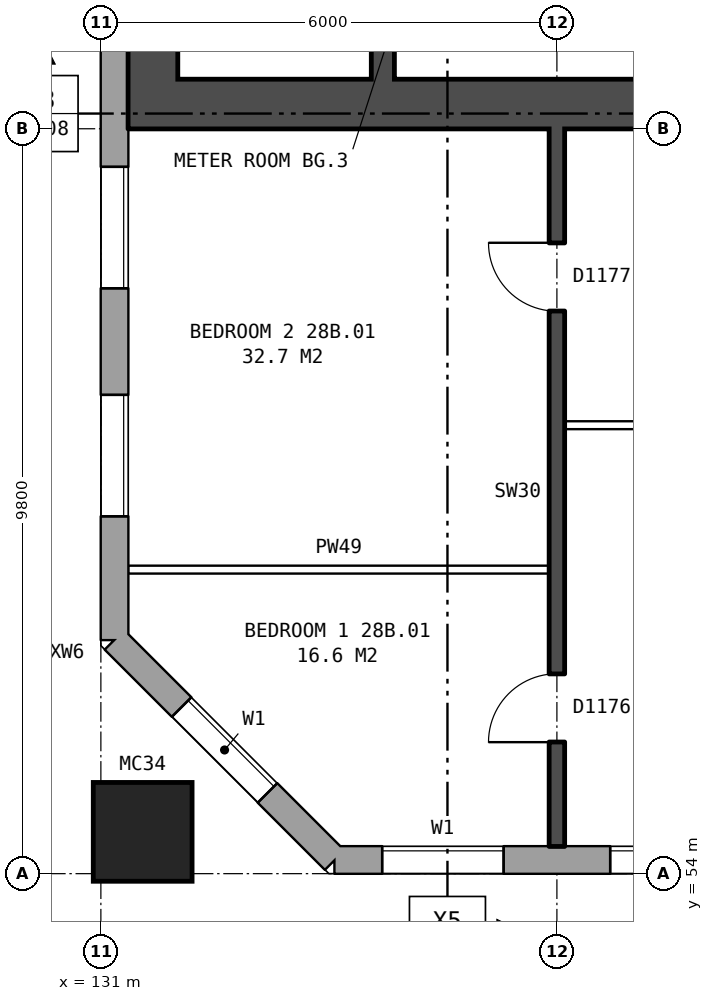
"""IFC4 building model, lengths in metres.
Left out: names, types, materials, properties, quantities, classifications, styles, units other than length and angle.
Written with IfcOpenShell. Run it as: python <this file> out.ifc"""

import sys

from ifc_helpers import new_model, si_unit, direction, frame, frame_2d, origin, origin_2d, place, context, subcontext, project, spatial, rectangle, hollow_rectangle, extrude, element, fill, save


model = new_model("IFC4")
c1 = context("Model", 3, precision=1e-05, world=origin(), true_north=direction((0.0, 1.0)))
c2 = subcontext(c1, "Body", "Model", "MODEL_VIEW")
j1 = project(units=[si_unit("LENGTHUNIT", "METRE"), si_unit("PLANEANGLEUNIT", "RADIAN")], contexts=[c1])
p1 = place(None, origin())
s1 = spatial("IfcSite", under=j1, at=p1, CompositionType="ELEMENT")
p2 = place(p1, origin())
s2 = spatial("IfcBuilding", under=s1, at=p2, CompositionType="ELEMENT")
p3 = place(p2, frame((0.0, 0.0, 102.6)))
s3 = spatial("IfcBuildingStorey", under=s2, at=p3, CompositionType="ELEMENT", Elevation=102.6)
p4 = place(p3, frame((131.55, 54.55, 0.0), z_axis=(0.0, 0.0, 1.0), x_axis=(1.0, 0.0, 0.0)))
e1 = element("IfcColumn", 1, at=p4, inside=s3, PredefinedType="COLUMN", context=c2, shape_type="SweptSolid", body=[
    extrude(hollow_rectangle(XDim=1.3, YDim=1.3, WallThickness=0.07, at=origin_2d()), origin(), (0.0, 0.0, 1.0), 3.1),
])
p5 = place(p3, frame((131.18, 57.075, 0.0), z_axis=(0.0, 0.0, 1.0), x_axis=(0.707106781187, -0.707106781187, 0.0)))
e2 = element("IfcWall", 2, at=p5, inside=s3, PredefinedType="STANDARD", context=c2, shape_type="SweptSolid", body=[
    extrude(rectangle(XDim=4.094, YDim=0.36, at=frame_2d((2.047, 0.0))), origin(), (0.0, 0.0, 1.0), 2.85),
])
p6 = place(p5, frame((1.247, 0.0, 0.8)))
e3 = element("IfcOpeningElement", 3, at=p6, cuts=e2, PredefinedType="OPENING", context=c2, shape_type="SweptSolid", body=[
    extrude(rectangle(XDim=1.6, YDim=1.8, at=frame_2d((0.8, 0.9))), frame((0.0, 0.19, 0.0), z_axis=(0.0, -1.0, 0.0), x_axis=(1.0, 0.0, 0.0)), (0.0, 0.0, 1.0), 0.38),
])
p7 = place(p3, frame((134.075, 54.18, 0.0), z_axis=(0.0, 0.0, 1.0), x_axis=(1.0, 0.0, 0.0)))
e4 = element("IfcWall", 4, at=p7, inside=s3, PredefinedType="STANDARD", context=c2, shape_type="SweptSolid", body=[
    extrude(rectangle(XDim=36.851, YDim=0.36, at=frame_2d((18.425, 0.0))), origin(), (0.0, 0.0, 1.0), 2.85),
])
p8 = place(p7, frame((0.625, 0.0, 0.8)))
e5 = element("IfcOpeningElement", 5, at=p8, cuts=e4, PredefinedType="OPENING", context=c2, shape_type="SweptSolid", body=[
    extrude(rectangle(XDim=1.6, YDim=1.8, at=frame_2d((0.8, 0.9))), frame((0.0, 0.19, 0.0), z_axis=(0.0, -1.0, 0.0), x_axis=(1.0, 0.0, 0.0)), (0.0, 0.0, 1.0), 0.38),
])
p9 = place(p7, frame((3.625, 0.0, 0.8)))
e6 = element("IfcOpeningElement", 6, at=p9, cuts=e4, PredefinedType="OPENING", context=c2, shape_type="SweptSolid", body=[
    extrude(rectangle(XDim=1.6, YDim=1.8, at=frame_2d((0.8, 0.9))), frame((0.0, 0.19, 0.0), z_axis=(0.0, -1.0, 0.0), x_axis=(1.0, 0.0, 0.0)), (0.0, 0.0, 1.0), 0.38),
])
p10 = place(p7, frame((7.475, 0.0, 0.8)))
e7 = element("IfcOpeningElement", 7, at=p10, cuts=e4, PredefinedType="OPENING", context=c2, shape_type="SweptSolid", body=[
    extrude(rectangle(XDim=1.2, YDim=1.2, at=frame_2d((0.6, 0.6))), frame((0.0, 0.19, 0.0), z_axis=(0.0, -1.0, 0.0), x_axis=(1.0, 0.0, 0.0)), (0.0, 0.0, 1.0), 0.38),
])
p11 = place(p7, frame((9.625, 0.0, 0.8)))
e8 = element("IfcOpeningElement", 8, at=p11, cuts=e4, PredefinedType="OPENING", context=c2, shape_type="SweptSolid", body=[
    extrude(rectangle(XDim=1.6, YDim=1.8, at=frame_2d((0.8, 0.9))), frame((0.0, 0.19, 0.0), z_axis=(0.0, -1.0, 0.0), x_axis=(1.0, 0.0, 0.0)), (0.0, 0.0, 1.0), 0.38),
])
p12 = place(p7, frame((12.625, 0.0, 0.8)))
e9 = element("IfcOpeningElement", 9, at=p12, cuts=e4, PredefinedType="OPENING", context=c2, shape_type="SweptSolid", body=[
    extrude(rectangle(XDim=1.6, YDim=1.8, at=frame_2d((0.8, 0.9))), frame((0.0, 0.19, 0.0), z_axis=(0.0, -1.0, 0.0), x_axis=(1.0, 0.0, 0.0)), (0.0, 0.0, 1.0), 0.38),
])
p13 = place(p7, frame((15.625, 0.0, 0.8)))
e10 = element("IfcOpeningElement", 10, at=p13, cuts=e4, PredefinedType="OPENING", context=c2, shape_type="SweptSolid", body=[
    extrude(rectangle(XDim=1.6, YDim=1.8, at=frame_2d((0.8, 0.9))), frame((0.0, 0.19, 0.0), z_axis=(0.0, -1.0, 0.0), x_axis=(1.0, 0.0, 0.0)), (0.0, 0.0, 1.0), 0.38),
])
p14 = place(p7, frame((18.625, 0.0, 0.8)))
e11 = element("IfcOpeningElement", 11, at=p14, cuts=e4, PredefinedType="OPENING", context=c2, shape_type="SweptSolid", body=[
    extrude(rectangle(XDim=1.6, YDim=1.8, at=frame_2d((0.8, 0.9))), frame((0.0, 0.19, 0.0), z_axis=(0.0, -1.0, 0.0), x_axis=(1.0, 0.0, 0.0)), (0.0, 0.0, 1.0), 0.38),
])
p15 = place(p7, frame((21.625, 0.0, 0.8)))
e12 = element("IfcOpeningElement", 12, at=p15, cuts=e4, PredefinedType="OPENING", context=c2, shape_type="SweptSolid", body=[
    extrude(rectangle(XDim=1.6, YDim=1.8, at=frame_2d((0.8, 0.9))), frame((0.0, 0.19, 0.0), z_axis=(0.0, -1.0, 0.0), x_axis=(1.0, 0.0, 0.0)), (0.0, 0.0, 1.0), 0.38),
])
p16 = place(p7, frame((24.625, 0.0, 0.8)))
e13 = element("IfcOpeningElement", 13, at=p16, cuts=e4, PredefinedType="OPENING", context=c2, shape_type="SweptSolid", body=[
    extrude(rectangle(XDim=1.6, YDim=1.8, at=frame_2d((0.8, 0.9))), frame((0.0, 0.19, 0.0), z_axis=(0.0, -1.0, 0.0), x_axis=(1.0, 0.0, 0.0)), (0.0, 0.0, 1.0), 0.38),
])
p17 = place(p7, frame((27.125, 0.0, 0.8)))
e14 = element("IfcOpeningElement", 14, at=p17, cuts=e4, PredefinedType="OPENING", context=c2, shape_type="SweptSolid", body=[
    extrude(rectangle(XDim=1.4, YDim=1.8, at=frame_2d((0.7, 0.9))), frame((0.0, 0.19, 0.0), z_axis=(0.0, -1.0, 0.0), x_axis=(1.0, 0.0, 0.0)), (0.0, 0.0, 1.0), 0.38),
])
p18 = place(p7, frame((28.825, 0.0, 0.8)))
e15 = element("IfcOpeningElement", 15, at=p18, cuts=e4, PredefinedType="OPENING", context=c2, shape_type="SweptSolid", body=[
    extrude(rectangle(XDim=0.8, YDim=0.9, at=frame_2d((0.4, 0.45))), frame((0.0, 0.19, 0.0), z_axis=(0.0, -1.0, 0.0), x_axis=(1.0, 0.0, 0.0)), (0.0, 0.0, 1.0), 0.38),
])
p19 = place(p7, frame((33.625, 0.0, 0.8)))
e16 = element("IfcOpeningElement", 16, at=p19, cuts=e4, PredefinedType="OPENING", context=c2, shape_type="SweptSolid", body=[
    extrude(rectangle(XDim=1.6, YDim=1.8, at=frame_2d((0.8, 0.9))), frame((0.0, 0.19, 0.0), z_axis=(0.0, -1.0, 0.0), x_axis=(1.0, 0.0, 0.0)), (0.0, 0.0, 1.0), 0.38),
])
p20 = place(p7, frame((30.825, 0.0, 1.7)))
e17 = element("IfcOpeningElement", 17, at=p20, cuts=e4, PredefinedType="OPENING", context=c2, shape_type="SweptSolid", body=[
    extrude(rectangle(XDim=0.8, YDim=0.9, at=frame_2d((0.4, 0.45))), frame((0.0, 0.19, 0.0), z_axis=(0.0, -1.0, 0.0), x_axis=(1.0, 0.0, 0.0)), (0.0, 0.0, 1.0), 0.38),
])
p21 = place(p7, frame((31.925, 0.0, 0.8)))
e18 = element("IfcOpeningElement", 18, at=p21, cuts=e4, PredefinedType="OPENING", context=c2, shape_type="SweptSolid", body=[
    extrude(rectangle(XDim=0.8, YDim=1.8, at=frame_2d((0.4, 0.9))), frame((0.0, 0.19, 0.0), z_axis=(0.0, -1.0, 0.0), x_axis=(1.0, 0.0, 0.0)), (0.0, 0.0, 1.0), 0.38),
])
p22 = place(p3, frame((131.18, 82.925, 0.0), z_axis=(0.0, 0.0, 1.0), x_axis=(0.0, -1.0, 0.0)))
e19 = element("IfcWall", 19, at=p22, inside=s3, PredefinedType="STANDARD", context=c2, shape_type="SweptSolid", body=[
    extrude(rectangle(XDim=25.851, YDim=0.36, at=frame_2d((12.925, 0.0))), origin(), (0.0, 0.0, 1.0), 2.85),
])
p23 = place(p22, frame((1.625, 0.0, 0.8)))
e20 = element("IfcOpeningElement", 20, at=p23, cuts=e19, PredefinedType="OPENING", context=c2, shape_type="SweptSolid", body=[
    extrude(rectangle(XDim=1.6, YDim=1.8, at=frame_2d((0.8, 0.9))), frame((0.0, 0.19, 0.0), z_axis=(0.0, -1.0, 0.0), x_axis=(1.0, 0.0, 0.0)), (0.0, 0.0, 1.0), 0.38),
])
p24 = place(p22, frame((4.625, 0.0, 0.8)))
e21 = element("IfcOpeningElement", 21, at=p24, cuts=e19, PredefinedType="OPENING", context=c2, shape_type="SweptSolid", body=[
    extrude(rectangle(XDim=1.6, YDim=1.8, at=frame_2d((0.8, 0.9))), frame((0.0, 0.19, 0.0), z_axis=(0.0, -1.0, 0.0), x_axis=(1.0, 0.0, 0.0)), (0.0, 0.0, 1.0), 0.38),
])
p25 = place(p22, frame((19.625, 0.0, 0.8)))
e22 = element("IfcOpeningElement", 22, at=p25, cuts=e19, PredefinedType="OPENING", context=c2, shape_type="SweptSolid", body=[
    extrude(rectangle(XDim=1.6, YDim=1.8, at=frame_2d((0.8, 0.9))), frame((0.0, 0.19, 0.0), z_axis=(0.0, -1.0, 0.0), x_axis=(1.0, 0.0, 0.0)), (0.0, 0.0, 1.0), 0.38),
])
p26 = place(p22, frame((22.625, 0.0, 0.8)))
e23 = element("IfcOpeningElement", 23, at=p26, cuts=e19, PredefinedType="OPENING", context=c2, shape_type="SweptSolid", body=[
    extrude(rectangle(XDim=1.6, YDim=1.8, at=frame_2d((0.8, 0.9))), frame((0.0, 0.19, 0.0), z_axis=(0.0, -1.0, 0.0), x_axis=(1.0, 0.0, 0.0)), (0.0, 0.0, 1.0), 0.38),
])
p27 = place(p3, frame((131.685, 64.45, 0.0), z_axis=(0.0, 0.0, 1.0), x_axis=(0.0, 1.0, 0.0)))
e24 = element("IfcWall", 24, at=p27, inside=s3, PredefinedType="SHEAR", context=c2, shape_type="SweptSolid", body=[
    extrude(rectangle(XDim=11.1, YDim=0.65, at=frame_2d((5.55, 0.0))), origin(), (0.0, 0.0, 1.0), 2.85),
])
p28 = place(p3, frame((139.76, 64.125, 0.0), z_axis=(0.0, 0.0, 1.0), x_axis=(-1.0, 0.0, 0.0)))
e25 = element("IfcWall", 25, at=p28, inside=s3, PredefinedType="SHEAR", context=c2, shape_type="SweptSolid", body=[
    extrude(rectangle(XDim=8.4, YDim=0.65, at=frame_2d((4.2, 0.0))), origin(), (0.0, 0.0, 1.0), 2.85),
])
p29 = place(p3, frame((134.71, 64.45, 0.0), z_axis=(0.0, 0.0, 1.0), x_axis=(0.0, 1.0, 0.0)))
e26 = element("IfcWall", 26, at=p29, inside=s3, PredefinedType="SHEAR", context=c2, shape_type="SweptSolid", body=[
    extrude(rectangle(XDim=6.65, YDim=0.3, at=frame_2d((3.325, 0.0))), origin(), (0.0, 0.0, 1.0), 2.85),
])
p30 = place(p3, frame((131.36, 58.0, 0.0), z_axis=(0.0, 0.0, 1.0), x_axis=(1.0, 0.0, 0.0)))
e27 = element("IfcWall", 27, at=p30, inside=s3, PredefinedType="PARTITIONING", context=c2, shape_type="SweptSolid", body=[
    extrude(rectangle(XDim=5.54, YDim=0.1, at=frame_2d((2.77, 0.0))), origin(), (0.0, 0.0, 1.0), 2.85),
])
p31 = place(p3, frame((137.1, 59.9, 0.0), z_axis=(0.0, 0.0, 1.0), x_axis=(1.0, 0.0, 0.0)))
e28 = element("IfcWall", 28, at=p31, inside=s3, PredefinedType="PARTITIONING", context=c2, shape_type="SweptSolid", body=[
    extrude(rectangle(XDim=5.8, YDim=0.1, at=frame_2d((2.9, 0.0))), origin(), (0.0, 0.0, 1.0), 2.85),
])
p32 = place(p31, frame((1.3, 0.0, 0.0)))
e29 = element("IfcOpeningElement", 29, at=p32, cuts=e28, PredefinedType="OPENING", context=c2, shape_type="SweptSolid", body=[
    extrude(rectangle(XDim=0.9, YDim=2.1, at=frame_2d((0.45, 1.05))), frame((0.0, 0.06, 0.0), z_axis=(0.0, -1.0, 0.0), x_axis=(1.0, 0.0, 0.0)), (0.0, 0.0, 1.0), 0.12),
])
p33 = place(p31, frame((4.2, 0.0, 0.0)))
e30 = element("IfcOpeningElement", 30, at=p33, cuts=e28, PredefinedType="OPENING", context=c2, shape_type="SweptSolid", body=[
    extrude(rectangle(XDim=0.9, YDim=2.1, at=frame_2d((0.45, 1.05))), frame((0.0, 0.06, 0.0), z_axis=(0.0, -1.0, 0.0), x_axis=(1.0, 0.0, 0.0)), (0.0, 0.0, 1.0), 0.12),
])
p34 = place(p3, frame((137.0, 54.36, 0.0), z_axis=(0.0, 0.0, 1.0), x_axis=(0.0, 1.0, 0.0)))
e31 = element("IfcWall", 31, at=p34, inside=s3, PredefinedType="SOLIDWALL", context=c2, shape_type="SweptSolid", body=[
    extrude(rectangle(XDim=9.44, YDim=0.2, at=frame_2d((4.72, 0.0))), origin(), (0.0, 0.0, 1.0), 2.85),
])
p35 = place(p34, frame((1.37, 0.0, 0.0)))
e32 = element("IfcOpeningElement", 32, at=p35, cuts=e31, PredefinedType="OPENING", context=c2, shape_type="SweptSolid", body=[
    extrude(rectangle(XDim=0.9, YDim=2.1, at=frame_2d((0.45, 1.05))), frame((0.0, 0.11, 0.0), z_axis=(0.0, -1.0, 0.0), x_axis=(1.0, 0.0, 0.0)), (0.0, 0.0, 1.0), 0.22),
])
p36 = place(p34, frame((7.04, 0.0, 0.0)))
e33 = element("IfcOpeningElement", 33, at=p36, cuts=e31, PredefinedType="OPENING", context=c2, shape_type="SweptSolid", body=[
    extrude(rectangle(XDim=0.9, YDim=2.1, at=frame_2d((0.45, 1.05))), frame((0.0, 0.11, 0.0), z_axis=(0.0, -1.0, 0.0), x_axis=(1.0, 0.0, 0.0)), (0.0, 0.0, 1.0), 0.22),
])
p37 = place(p6, origin())
e34 = element("IfcWindow", 34, at=p37, inside=s3, PartitioningType="SINGLE_PANEL", PredefinedType="WINDOW", context=c2, shape_type="SweptSolid", body=[
    extrude(rectangle(XDim=1.6, YDim=1.8, at=frame_2d((0.8, 0.9))), frame((0.0, 0.15, 0.0), z_axis=(0.0, -1.0, 0.0), x_axis=(1.0, 0.0, 0.0)), (0.0, 0.0, 1.0), 0.06),
])
fill(e3, e34)
p38 = place(p8, origin())
e35 = element("IfcWindow", 35, at=p38, inside=s3, PartitioningType="SINGLE_PANEL", PredefinedType="WINDOW", context=c2, shape_type="SweptSolid", body=[
    extrude(rectangle(XDim=1.6, YDim=1.8, at=frame_2d((0.8, 0.9))), frame((0.0, 0.15, 0.0), z_axis=(0.0, -1.0, 0.0), x_axis=(1.0, 0.0, 0.0)), (0.0, 0.0, 1.0), 0.06),
])
fill(e5, e35)
p39 = place(p9, origin())
e36 = element("IfcWindow", 36, at=p39, inside=s3, PartitioningType="SINGLE_PANEL", PredefinedType="WINDOW", context=c2, shape_type="SweptSolid", body=[
    extrude(rectangle(XDim=1.6, YDim=1.8, at=frame_2d((0.8, 0.9))), frame((0.0, 0.15, 0.0), z_axis=(0.0, -1.0, 0.0), x_axis=(1.0, 0.0, 0.0)), (0.0, 0.0, 1.0), 0.06),
])
fill(e6, e36)
p40 = place(p25, origin())
e37 = element("IfcWindow", 37, at=p40, inside=s3, PartitioningType="SINGLE_PANEL", PredefinedType="WINDOW", context=c2, shape_type="SweptSolid", body=[
    extrude(rectangle(XDim=1.6, YDim=1.8, at=frame_2d((0.8, 0.9))), frame((0.0, 0.15, 0.0), z_axis=(0.0, -1.0, 0.0), x_axis=(1.0, 0.0, 0.0)), (0.0, 0.0, 1.0), 0.06),
])
fill(e22, e37)
p41 = place(p26, origin())
e38 = element("IfcWindow", 38, at=p41, inside=s3, PartitioningType="SINGLE_PANEL", PredefinedType="WINDOW", context=c2, shape_type="SweptSolid", body=[
    extrude(rectangle(XDim=1.6, YDim=1.8, at=frame_2d((0.8, 0.9))), frame((0.0, 0.15, 0.0), z_axis=(0.0, -1.0, 0.0), x_axis=(1.0, 0.0, 0.0)), (0.0, 0.0, 1.0), 0.06),
])
fill(e23, e38)
p42 = place(p35, origin())
e39 = element("IfcDoor", 39, at=p42, inside=s3, OperationType="SINGLE_SWING_LEFT", PredefinedType="DOOR", context=c2, shape_type="SweptSolid", body=[
    extrude(rectangle(XDim=0.9, YDim=2.1, at=frame_2d((0.45, 1.05))), frame((0.0, 0.025, 0.0), z_axis=(0.0, -1.0, 0.0), x_axis=(1.0, 0.0, 0.0)), (0.0, 0.0, 1.0), 0.05),
])
fill(e32, e39)
p43 = place(p36, origin())
e40 = element("IfcDoor", 40, at=p43, inside=s3, OperationType="SINGLE_SWING_RIGHT", PredefinedType="DOOR", context=c2, shape_type="SweptSolid", body=[
    extrude(rectangle(XDim=0.9, YDim=2.1, at=frame_2d((0.45, 1.05))), frame((0.0, 0.025, 0.0), z_axis=(0.0, -1.0, 0.0), x_axis=(1.0, 0.0, 0.0)), (0.0, 0.0, 1.0), 0.05),
])
fill(e33, e40)
save(model, sys.argv[1])
